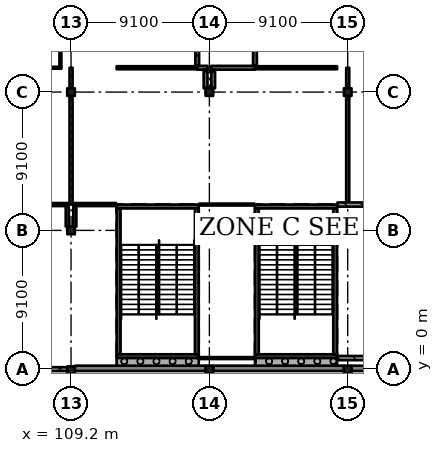
"""IFC4 building model, lengths in metres.
Left out: names, types, materials, properties, quantities, classifications, styles, units other than length and angle.
Written with IfcOpenShell. Run it as: python <this file> out.ifc"""

import sys

from ifc_helpers import new_model, si_unit, direction, frame, frame_2d, origin, origin_2d, place, context, subcontext, project, spatial, rectangle, extrude, element, fill, save


model = new_model("IFC4")
c1 = context("Model", 3, precision=1e-05, world=origin(), true_north=direction((0.0, 1.0)))
c2 = subcontext(c1, "Body", "Model", "MODEL_VIEW")
j1 = project(units=[si_unit("LENGTHUNIT", "METRE"), si_unit("PLANEANGLEUNIT", "RADIAN")], contexts=[c1])
p1 = place(None, origin())
s1 = spatial("IfcSite", under=j1, at=p1, CompositionType="ELEMENT")
p2 = place(p1, origin())
s2 = spatial("IfcBuilding", under=s1, at=p2, CompositionType="ELEMENT")
p3 = place(p2, frame((0.0, 0.0, 24.57)))
s3 = spatial("IfcBuildingStorey", under=s2, at=p3, CompositionType="ELEMENT", Elevation=24.57)
for number, where, z_axis, x_axis in (
    (1, (109.2, -0.1, 0.0), (0.0, 0.0, 1.0), (1.0, 0.0, 0.0)),
    (2, (109.2, 9.1, 0.0), (0.0, 0.0, 1.0), (1.0, 0.0, 0.0)),
    (3, (109.2, 18.2, 0.0), (0.0, 0.0, 1.0), (1.0, 0.0, 0.0)),
    (4, (118.3, -0.05, 0.0), (0.0, 0.0, 1.0), (1.0, 0.0, 0.0)),
    (5, (118.3, 9.1, 0.0), (0.0, 0.0, 1.0), (1.0, 0.0, 0.0)),
    (6, (118.3, 18.2, 0.0), (0.0, 0.0, 1.0), (1.0, 0.0, 0.0)),
    (7, (127.4, -0.05, 0.0), (0.0, 0.0, 1.0), (1.0, 0.0, 0.0)),
    (8, (127.4, 9.1, 0.0), (0.0, 0.0, 1.0), (1.0, 0.0, 0.0)),
    (9, (127.4, 18.2, 0.0), (0.0, 0.0, 1.0), (1.0, 0.0, 0.0)),
):
    element("IfcColumn", number, at=place(p3, frame(where, z_axis=z_axis, x_axis=x_axis)), inside=s3, PredefinedType="COLUMN", context=c2, shape_type="SweptSolid", body=[
        extrude(rectangle(XDim=0.5, YDim=0.5, at=origin_2d()), origin(), (0.0, 0.0, 1.0), 4.55),
    ])
p4 = place(p3, frame((126.7, 0.825, 0.0), z_axis=(0.0, 0.0, 1.0), x_axis=(-1.0, 0.0, 0.0)))
e10 = element("IfcWall", 10, at=p4, inside=s3, PredefinedType="SHEAR", context=c2, shape_type="SweptSolid", body=[
    extrude(rectangle(XDim=5.4, YDim=0.25, at=frame_2d((2.7, 0.0))), origin(), (0.0, 0.0, 1.0), 4.55),
])
p5 = place(p3, frame((126.7, 10.675, 0.0), z_axis=(0.0, 0.0, 1.0), x_axis=(-1.0, 0.0, 0.0)))
e11 = element("IfcWall", 11, at=p5, inside=s3, PredefinedType="SHEAR", context=c2, shape_type="SweptSolid", body=[
    extrude(rectangle(XDim=5.4, YDim=0.25, at=frame_2d((2.7, 0.0))), origin(), (0.0, 0.0, 1.0), 4.55),
])
p6 = place(p5, frame((1.5, 0.0, 0.0)))
e12 = element("IfcOpeningElement", 12, at=p6, cuts=e11, PredefinedType="OPENING", context=c2, shape_type="SweptSolid", body=[
    extrude(rectangle(XDim=2.4, YDim=2.1, at=frame_2d((1.2, 1.05))), frame((0.0, 0.135, 0.0), z_axis=(0.0, -1.0, 0.0), x_axis=(1.0, 0.0, 0.0)), (0.0, 0.0, 1.0), 0.27),
])
for number, where, z_axis, x_axis in (
    (13, (121.425, 10.55, 0.0), (0.0, 0.0, 1.0), (0.0, -1.0, 0.0)),
    (14, (126.575, 10.55, 0.0), (0.0, 0.0, 1.0), (0.0, -1.0, 0.0)),
):
    element("IfcWall", number, at=place(p3, frame(where, z_axis=z_axis, x_axis=x_axis)), inside=s3, PredefinedType="SHEAR", context=c2, shape_type="SweptSolid", body=[
        extrude(rectangle(XDim=9.6, YDim=0.25, at=frame_2d((4.8, 0.0))), origin(), (0.0, 0.0, 1.0), 4.55),
    ])
p7 = place(p3, frame((117.6, 0.825, 0.0), z_axis=(0.0, 0.0, 1.0), x_axis=(-1.0, 0.0, 0.0)))
e15 = element("IfcWall", 15, at=p7, inside=s3, PredefinedType="SHEAR", context=c2, shape_type="SweptSolid", body=[
    extrude(rectangle(XDim=5.4, YDim=0.25, at=frame_2d((2.7, 0.0))), origin(), (0.0, 0.0, 1.0), 4.55),
])
p8 = place(p3, frame((117.6, 10.675, 0.0), z_axis=(0.0, 0.0, 1.0), x_axis=(-1.0, 0.0, 0.0)))
e16 = element("IfcWall", 16, at=p8, inside=s3, PredefinedType="SHEAR", context=c2, shape_type="SweptSolid", body=[
    extrude(rectangle(XDim=5.4, YDim=0.25, at=frame_2d((2.7, 0.0))), origin(), (0.0, 0.0, 1.0), 4.55),
])
p9 = place(p8, frame((1.5, 0.0, 0.0)))
e17 = element("IfcOpeningElement", 17, at=p9, cuts=e16, PredefinedType="OPENING", context=c2, shape_type="SweptSolid", body=[
    extrude(rectangle(XDim=2.4, YDim=2.1, at=frame_2d((1.2, 1.05))), frame((0.0, 0.135, 0.0), z_axis=(0.0, -1.0, 0.0), x_axis=(1.0, 0.0, 0.0)), (0.0, 0.0, 1.0), 0.27),
])
for number, where, z_axis, x_axis in (
    (18, (112.325, 10.55, 0.0), (0.0, 0.0, 1.0), (0.0, -1.0, 0.0)),
    (19, (117.475, 10.55, 0.0), (0.0, 0.0, 1.0), (0.0, -1.0, 0.0)),
):
    element("IfcWall", number, at=place(p3, frame(where, z_axis=z_axis, x_axis=x_axis)), inside=s3, PredefinedType="SHEAR", context=c2, shape_type="SweptSolid", body=[
        extrude(rectangle(XDim=9.6, YDim=0.25, at=frame_2d((4.8, 0.0))), origin(), (0.0, 0.0, 1.0), 4.55),
    ])
p10 = place(p3, frame((104.65, -0.025, 0.0), z_axis=(0.0, 0.0, 1.0), x_axis=(1.0, 0.0, 0.0)))
e20 = element("IfcWall", 20, at=p10, inside=s3, PredefinedType="SOLIDWALL", context=c2, shape_type="SweptSolid", body=[
    extrude(rectangle(XDim=4.3, YDim=0.25, at=frame_2d((2.15, 0.0))), origin(), (0.0, 0.0, 1.0), 3.6),
])
p11 = place(p3, frame((109.45, 0.025, 0.0), z_axis=(0.0, 0.0, 1.0), x_axis=(1.0, 0.0, 0.0)))
e21 = element("IfcWall", 21, at=p11, inside=s3, PredefinedType="SOLIDWALL", context=c2, shape_type="SweptSolid", body=[
    extrude(rectangle(XDim=8.6, YDim=0.35, at=frame_2d((4.3, 0.0))), origin(), (0.0, 0.0, 1.0), 3.6),
])
p12 = place(p3, frame((118.55, 0.025, 0.0), z_axis=(0.0, 0.0, 1.0), x_axis=(1.0, 0.0, 0.0)))
e22 = element("IfcWall", 22, at=p12, inside=s3, PredefinedType="SOLIDWALL", context=c2, shape_type="SweptSolid", body=[
    extrude(rectangle(XDim=8.6, YDim=0.35, at=frame_2d((4.3, 0.0))), origin(), (0.0, 0.0, 1.0), 3.6),
])
p13 = place(p3, frame((127.65, 0.025, 0.0), z_axis=(0.0, 0.0, 1.0), x_axis=(1.0, 0.0, 0.0)))
e23 = element("IfcWall", 23, at=p13, inside=s3, PredefinedType="SOLIDWALL", context=c2, shape_type="SweptSolid", body=[
    extrude(rectangle(XDim=8.6, YDim=0.35, at=frame_2d((4.3, 0.0))), origin(), (0.0, 0.0, 1.0), 3.6),
])
p14 = place(p3, frame((121.3, 0.45, 0.0), z_axis=(0.0, 0.0, 1.0), x_axis=(1.0, 0.0, 0.0)))
e24 = element("IfcWall", 24, at=p14, inside=s3, PredefinedType="SOLIDWALL", context=c2, shape_type="SweptSolid", body=[
    extrude(rectangle(XDim=5.4, YDim=0.5, at=frame_2d((2.7, 0.0))), origin(), (0.0, 0.0, 1.0), 4.35),
])
p15 = place(p3, frame((112.2, 0.45, 0.0), z_axis=(0.0, 0.0, 1.0), x_axis=(1.0, 0.0, 0.0)))
e25 = element("IfcWall", 25, at=p15, inside=s3, PredefinedType="SOLIDWALL", context=c2, shape_type="SweptSolid", body=[
    extrude(rectangle(XDim=5.4, YDim=0.5, at=frame_2d((2.7, 0.0))), origin(), (0.0, 0.0, 1.0), 4.35),
])
p16 = place(p3, frame((104.9, 19.8, 0.0), z_axis=(0.0, 0.0, 1.0), x_axis=(1.0, 0.0, 0.0)))
e26 = element("IfcWall", 26, at=p16, inside=s3, PredefinedType="PARTITIONING", context=c2, shape_type="SweptSolid", body=[
    extrude(rectangle(XDim=3.663, YDim=0.125, at=frame_2d((1.831, 0.0))), origin(), (0.0, 0.0, 1.0), 4.35),
])
p17 = place(p16, frame((1.35, 0.0, 0.0)))
e27 = element("IfcOpeningElement", 27, at=p17, cuts=e26, PredefinedType="OPENING", context=c2, shape_type="SweptSolid", body=[
    extrude(rectangle(XDim=0.9, YDim=2.1, at=frame_2d((0.45, 1.05))), frame((0.0, 0.073, 0.0), z_axis=(0.0, -1.0, 0.0), x_axis=(1.0, 0.0, 0.0)), (0.0, 0.0, 1.0), 0.145),
])
p18 = place(p3, frame((108.5, 19.863, 0.0), z_axis=(0.0, 0.0, 1.0), x_axis=(0.0, 1.0, 0.0)))
e28 = element("IfcWall", 28, at=p18, inside=s3, PredefinedType="PARTITIONING", context=c2, shape_type="SweptSolid", body=[
    extrude(rectangle(XDim=7.125, YDim=0.125, at=frame_2d((3.562, 0.0))), origin(), (0.0, 0.0, 1.0), 4.35),
])
p19 = place(p3, frame((108.95, 9.35, 0.0), z_axis=(0.0, 0.0, 1.0), x_axis=(0.0, 1.0, 0.0)))
e29 = element("IfcWall", 29, at=p19, inside=s3, PredefinedType="PARTITIONING", context=c2, shape_type="SweptSolid", body=[
    extrude(rectangle(XDim=1.35, YDim=0.2, at=frame_2d((0.675, 0.0))), origin(), (0.0, 0.0, 1.0), 4.35),
])
p20 = place(p3, frame((109.05, 10.8, 0.0), z_axis=(0.0, 0.0, 1.0), x_axis=(-1.0, 0.0, 0.0)))
e30 = element("IfcWall", 30, at=p20, inside=s3, PredefinedType="PARTITIONING", context=c2, shape_type="SweptSolid", body=[
    extrude(rectangle(XDim=4.15, YDim=0.2, at=frame_2d((2.075, 0.0))), origin(), (0.0, 0.0, 1.0), 4.35),
])
p21 = place(p20, frame((1.15, 0.0, 0.0)))
e31 = element("IfcOpeningElement", 31, at=p21, cuts=e30, PredefinedType="OPENING", context=c2, shape_type="SweptSolid", body=[
    extrude(rectangle(XDim=1.8, YDim=2.4, at=frame_2d((0.9, 1.2))), frame((0.0, 0.11, 0.0), z_axis=(0.0, -1.0, 0.0), x_axis=(1.0, 0.0, 0.0)), (0.0, 0.0, 1.0), 0.22),
])
p22 = place(p3, frame((109.2, 10.8, 0.0), z_axis=(0.0, 0.0, 1.0), x_axis=(0.0, 1.0, 0.0)))
e32 = element("IfcWall", 32, at=p22, inside=s3, PredefinedType="PARTITIONING", context=c2, shape_type="SweptSolid", body=[
    extrude(rectangle(XDim=7.15, YDim=0.2, at=frame_2d((3.575, 0.0))), origin(), (0.0, 0.0, 1.0), 3.6),
])
p23 = place(p22, frame((0.85, 0.0, 0.0)))
e33 = element("IfcOpeningElement", 33, at=p23, cuts=e32, PredefinedType="OPENING", context=c2, shape_type="SweptSolid", body=[
    extrude(rectangle(XDim=1.8, YDim=2.4, at=frame_2d((0.9, 1.2))), frame((0.0, 0.11, 0.0), z_axis=(0.0, -1.0, 0.0), x_axis=(1.0, 0.0, 0.0)), (0.0, 0.0, 1.0), 0.22),
])
p24 = place(p22, frame((4.45, 0.0, 0.0)))
e34 = element("IfcOpeningElement", 34, at=p24, cuts=e32, PredefinedType="OPENING", context=c2, shape_type="SweptSolid", body=[
    extrude(rectangle(XDim=1.8, YDim=2.4, at=frame_2d((0.9, 1.2))), frame((0.0, 0.11, 0.0), z_axis=(0.0, -1.0, 0.0), x_axis=(1.0, 0.0, 0.0)), (0.0, 0.0, 1.0), 0.22),
])
p25 = place(p3, frame((109.2, 18.45, 0.0), z_axis=(0.0, 0.0, 1.0), x_axis=(0.0, 1.0, 0.0)))
e35 = element("IfcWall", 35, at=p25, inside=s3, PredefinedType="PARTITIONING", context=c2, shape_type="SweptSolid", body=[
    extrude(rectangle(XDim=1.35, YDim=0.2, at=frame_2d((0.675, 0.0))), origin(), (0.0, 0.0, 1.0), 3.6),
])
p26 = place(p3, frame((109.45, 10.7, 0.0), z_axis=(0.0, 0.0, 1.0), x_axis=(0.0, -1.0, 0.0)))
e36 = element("IfcWall", 36, at=p26, inside=s3, PredefinedType="PARTITIONING", context=c2, shape_type="SweptSolid", body=[
    extrude(rectangle(XDim=1.35, YDim=0.2, at=frame_2d((0.675, 0.0))), origin(), (0.0, 0.0, 1.0), 4.35),
])
p27 = place(p3, frame((112.17, 10.8, 0.0), z_axis=(0.0, 0.0, 1.0), x_axis=(-1.0, 0.0, 0.0)))
e37 = element("IfcWall", 37, at=p27, inside=s3, PredefinedType="PARTITIONING", context=c2, shape_type="SweptSolid", body=[
    extrude(rectangle(XDim=2.82, YDim=0.2, at=frame_2d((1.41, 0.0))), origin(), (0.0, 0.0, 1.0), 4.35),
])
p28 = place(p27, frame((0.55, 0.0, 0.0)))
e38 = element("IfcOpeningElement", 38, at=p28, cuts=e37, PredefinedType="OPENING", context=c2, shape_type="SweptSolid", body=[
    extrude(rectangle(XDim=1.8, YDim=2.4, at=frame_2d((0.9, 1.2))), frame((0.0, 0.11, 0.0), z_axis=(0.0, -1.0, 0.0), x_axis=(1.0, 0.0, 0.0)), (0.0, 0.0, 1.0), 0.22),
])
p29 = place(p3, frame((112.2, 19.8, 0.0), z_axis=(0.0, 0.0, 1.0), x_axis=(1.0, 0.0, 0.0)))
e39 = element("IfcWall", 39, at=p29, inside=s3, PredefinedType="PARTITIONING", context=c2, shape_type="SweptSolid", body=[
    extrude(rectangle(XDim=5.3, YDim=0.2, at=frame_2d((2.65, 0.0))), origin(), (0.0, 0.0, 1.0), 4.35),
])
p30 = place(p29, frame((1.75, 0.0, 0.0)))
e40 = element("IfcOpeningElement", 40, at=p30, cuts=e39, PredefinedType="OPENING", context=c2, shape_type="SweptSolid", body=[
    extrude(rectangle(XDim=1.8, YDim=2.4, at=frame_2d((0.9, 1.2))), frame((0.0, 0.11, 0.0), z_axis=(0.0, -1.0, 0.0), x_axis=(1.0, 0.0, 0.0)), (0.0, 0.0, 1.0), 0.22),
])
p31 = place(p3, frame((117.5, 19.8, 0.0), z_axis=(0.0, 0.0, 1.0), x_axis=(1.0, 0.0, 0.0)))
e41 = element("IfcWall", 41, at=p31, inside=s3, PredefinedType="SOLIDWALL", context=c2, shape_type="SweptSolid", body=[
    extrude(rectangle(XDim=0.675, YDim=0.25, at=frame_2d((0.337, 0.0))), origin(), (0.0, 0.0, 1.0), 4.35),
])
p32 = place(p3, frame((117.5, 19.925, 0.0), z_axis=(0.0, 0.0, 1.0), x_axis=(0.0, 1.0, 0.0)))
e42 = element("IfcWall", 42, at=p32, inside=s3, PredefinedType="SOLIDWALL", context=c2, shape_type="SweptSolid", body=[
    extrude(rectangle(XDim=2.845, YDim=0.25, at=frame_2d((1.422, 0.0))), origin(), (0.0, 0.0, 1.0), 4.35),
])
for number, where, z_axis, x_axis in (
    (43, (117.63, 8.85, 0.0), (0.0, 0.0, 1.0), (1.0, 0.0, 0.0)),
    (44, (118.05, 9.35, 0.0), (0.0, 0.0, 1.0), (-1.0, 0.0, 0.0)),
):
    element("IfcWall", number, at=place(p3, frame(where, z_axis=z_axis, x_axis=x_axis)), inside=s3, PredefinedType="PARTITIONING", context=c2, shape_type="SweptSolid", body=[
        extrude(rectangle(XDim=0.42, YDim=0.125, at=frame_2d((0.21, 0.0))), origin(), (0.0, 0.0, 1.0), 4.35),
    ])
p33 = place(p3, frame((118.05, 19.675, 0.0), z_axis=(0.0, 0.0, 1.0), x_axis=(0.0, -1.0, 0.0)))
e45 = element("IfcWall", 45, at=p33, inside=s3, PredefinedType="SOLIDWALL", context=c2, shape_type="SweptSolid", body=[
    extrude(rectangle(XDim=1.225, YDim=0.25, at=frame_2d((0.613, 0.0))), origin(), (0.0, 0.0, 1.0), 3.6),
])
p34 = place(p3, frame((118.425, 19.8, 0.0), z_axis=(0.0, 0.0, 1.0), x_axis=(1.0, 0.0, 0.0)))
e46 = element("IfcWall", 46, at=p34, inside=s3, PredefinedType="SOLIDWALL", context=c2, shape_type="SweptSolid", body=[
    extrude(rectangle(XDim=2.875, YDim=0.25, at=frame_2d((1.438, 0.0))), origin(), (0.0, 0.0, 1.0), 4.35),
])
p35 = place(p34, frame((0.95, 0.0, 0.0)))
e47 = element("IfcOpeningElement", 47, at=p35, cuts=e46, PredefinedType="OPENING", context=c2, shape_type="SweptSolid", body=[
    extrude(rectangle(XDim=1.0, YDim=2.1, at=frame_2d((0.5, 1.05))), frame((0.0, 0.135, 0.0), z_axis=(0.0, -1.0, 0.0), x_axis=(1.0, 0.0, 0.0)), (0.0, 0.0, 1.0), 0.27),
])
p36 = place(p3, frame((118.55, 18.45, 0.0), z_axis=(0.0, 0.0, 1.0), x_axis=(0.0, 1.0, 0.0)))
e48 = element("IfcWall", 48, at=p36, inside=s3, PredefinedType="SOLIDWALL", context=c2, shape_type="SweptSolid", body=[
    extrude(rectangle(XDim=1.225, YDim=0.25, at=frame_2d((0.613, 0.0))), origin(), (0.0, 0.0, 1.0), 3.6),
])
p37 = place(p3, frame((121.27, 0.7, 0.0), z_axis=(0.0, 0.0, 1.0), x_axis=(-1.0, 0.0, 0.0)))
e49 = element("IfcWall", 49, at=p37, inside=s3, PredefinedType="PARTITIONING", context=c2, shape_type="SweptSolid", body=[
    extrude(rectangle(XDim=3.64, YDim=0.125, at=frame_2d((1.82, 0.0))), origin(), (0.0, 0.0, 1.0), 4.35),
])
p38 = place(p3, frame((121.27, 10.8, 0.0), z_axis=(0.0, 0.0, 1.0), x_axis=(-1.0, 0.0, 0.0)))
e50 = element("IfcWall", 50, at=p38, inside=s3, PredefinedType="PARTITIONING", context=c2, shape_type="SweptSolid", body=[
    extrude(rectangle(XDim=3.64, YDim=0.125, at=frame_2d((1.82, 0.0))), origin(), (0.0, 0.0, 1.0), 4.35),
])
p39 = place(p38, frame((1.35, 0.0, 0.0)))
e51 = element("IfcOpeningElement", 51, at=p39, cuts=e50, PredefinedType="OPENING", context=c2, shape_type="SweptSolid", body=[
    extrude(rectangle(XDim=0.9, YDim=2.1, at=frame_2d((0.45, 1.05))), frame((0.0, 0.073, 0.0), z_axis=(0.0, -1.0, 0.0), x_axis=(1.0, 0.0, 0.0)), (0.0, 0.0, 1.0), 0.145),
])
p40 = place(p3, frame((121.3, 19.8, 0.0), z_axis=(0.0, 0.0, 1.0), x_axis=(1.0, 0.0, 0.0)))
e52 = element("IfcWall", 52, at=p40, inside=s3, PredefinedType="PARTITIONING", context=c2, shape_type="SweptSolid", body=[
    extrude(rectangle(XDim=5.4, YDim=0.2, at=frame_2d((2.7, 0.0))), origin(), (0.0, 0.0, 1.0), 4.35),
])
p41 = place(p40, frame((1.85, 0.0, 0.0)))
e53 = element("IfcOpeningElement", 53, at=p41, cuts=e52, PredefinedType="OPENING", context=c2, shape_type="SweptSolid", body=[
    extrude(rectangle(XDim=1.8, YDim=2.4, at=frame_2d((0.9, 1.2))), frame((0.0, 0.11, 0.0), z_axis=(0.0, -1.0, 0.0), x_axis=(1.0, 0.0, 0.0)), (0.0, 0.0, 1.0), 0.22),
])
p42 = place(p3, frame((121.3, 19.925, 0.0), z_axis=(0.0, 0.0, 1.0), x_axis=(0.0, 1.0, 0.0)))
e54 = element("IfcWall", 54, at=p42, inside=s3, PredefinedType="SOLIDWALL", context=c2, shape_type="SweptSolid", body=[
    extrude(rectangle(XDim=6.945, YDim=0.25, at=frame_2d((3.473, 0.0))), origin(), (0.0, 0.0, 1.0), 4.35),
])
for number, where, z_axis, x_axis in (
    (55, (126.73, 8.85, 0.0), (0.0, 0.0, 1.0), (1.0, 0.0, 0.0)),
    (56, (127.15, 9.35, 0.0), (0.0, 0.0, 1.0), (-1.0, 0.0, 0.0)),
):
    element("IfcWall", number, at=place(p3, frame(where, z_axis=z_axis, x_axis=x_axis)), inside=s3, PredefinedType="SOLIDWALL", context=c2, shape_type="SweptSolid", body=[
        extrude(rectangle(XDim=0.42, YDim=0.275, at=frame_2d((0.21, 0.0))), origin(), (0.0, 0.0, 1.0), 4.35),
    ])
p43 = place(p3, frame((126.73, 10.8, 0.0), z_axis=(0.0, 0.0, 1.0), x_axis=(1.0, 0.0, 0.0)))
e57 = element("IfcWall", 57, at=p43, inside=s3, PredefinedType="SOLIDWALL", context=c2, shape_type="SweptSolid", body=[
    extrude(rectangle(XDim=3.64, YDim=0.275, at=frame_2d((1.82, 0.0))), origin(), (0.0, 0.0, 1.0), 4.35),
])
p44 = place(p43, frame((1.59, 0.0, 0.0)))
e58 = element("IfcOpeningElement", 58, at=p44, cuts=e57, PredefinedType="OPENING", context=c2, shape_type="SweptSolid", body=[
    extrude(rectangle(XDim=1.2, YDim=2.4, at=frame_2d((0.6, 1.2))), frame((0.0, 0.147, 0.0), z_axis=(0.0, -1.0, 0.0), x_axis=(1.0, 0.0, 0.0)), (0.0, 0.0, 1.0), 0.295),
])
p45 = place(p3, frame((127.4, 10.938, 0.0), z_axis=(0.0, 0.0, 1.0), x_axis=(0.0, 1.0, 0.0)))
e59 = element("IfcWall", 59, at=p45, inside=s3, PredefinedType="PARTITIONING", context=c2, shape_type="SweptSolid", body=[
    extrude(rectangle(XDim=7.012, YDim=0.2, at=frame_2d((3.506, 0.0))), origin(), (0.0, 0.0, 1.0), 3.6),
])
p46 = place(p45, frame((0.85, 0.0, 0.0)))
e60 = element("IfcOpeningElement", 60, at=p46, cuts=e59, PredefinedType="OPENING", context=c2, shape_type="SweptSolid", body=[
    extrude(rectangle(XDim=1.8, YDim=2.4, at=frame_2d((0.9, 1.2))), frame((0.0, 0.11, 0.0), z_axis=(0.0, -1.0, 0.0), x_axis=(1.0, 0.0, 0.0)), (0.0, 0.0, 1.0), 0.22),
])
p47 = place(p45, frame((4.35, 0.0, 0.0)))
e61 = element("IfcOpeningElement", 61, at=p47, cuts=e59, PredefinedType="OPENING", context=c2, shape_type="SweptSolid", body=[
    extrude(rectangle(XDim=1.8, YDim=2.4, at=frame_2d((0.9, 1.2))), frame((0.0, 0.11, 0.0), z_axis=(0.0, -1.0, 0.0), x_axis=(1.0, 0.0, 0.0)), (0.0, 0.0, 1.0), 0.22),
])
p48 = place(p3, frame((127.4, 18.45, 0.0), z_axis=(0.0, 0.0, 1.0), x_axis=(0.0, 1.0, 0.0)))
e62 = element("IfcWall", 62, at=p48, inside=s3, PredefinedType="PARTITIONING", context=c2, shape_type="SweptSolid", body=[
    extrude(rectangle(XDim=1.35, YDim=0.2, at=frame_2d((0.675, 0.0))), origin(), (0.0, 0.0, 1.0), 3.6),
])
p49 = place(p3, frame((130.37, 0.7, 0.0), z_axis=(0.0, 0.0, 1.0), x_axis=(-1.0, 0.0, 0.0)))
e63 = element("IfcWall", 63, at=p49, inside=s3, PredefinedType="SOLIDWALL", context=c2, shape_type="SweptSolid", body=[
    extrude(rectangle(XDim=3.64, YDim=0.275, at=frame_2d((1.82, 0.0))), origin(), (0.0, 0.0, 1.0), 4.35),
])
p50 = place(p35, origin())
e64 = element("IfcDoor", 64, at=p50, inside=s3, OperationType="SINGLE_SWING_LEFT", PredefinedType="DOOR", context=c2, shape_type="SweptSolid", body=[
    extrude(rectangle(XDim=1.0, YDim=2.1, at=frame_2d((0.5, 1.05))), frame((0.0, 0.025, 0.0), z_axis=(0.0, -1.0, 0.0), x_axis=(1.0, 0.0, 0.0)), (0.0, 0.0, 1.0), 0.05),
])
fill(e47, e64)
p51 = place(p44, origin())
e65 = element("IfcDoor", 65, at=p51, inside=s3, OperationType="SINGLE_SWING_RIGHT", PredefinedType="DOOR", context=c2, shape_type="SweptSolid", body=[
    extrude(rectangle(XDim=1.2, YDim=2.4, at=frame_2d((0.6, 1.2))), frame((0.0, 0.025, 0.0), z_axis=(0.0, -1.0, 0.0), x_axis=(1.0, 0.0, 0.0)), (0.0, 0.0, 1.0), 0.05),
])
fill(e58, e65)
p52 = place(p39, origin())
e66 = element("IfcDoor", 66, at=p52, inside=s3, OperationType="SINGLE_SWING_RIGHT", PredefinedType="DOOR", context=c2, shape_type="SweptSolid", body=[
    extrude(rectangle(XDim=0.9, YDim=2.1, at=frame_2d((0.45, 1.05))), frame((0.0, 0.025, 0.0), z_axis=(0.0, -1.0, 0.0), x_axis=(1.0, 0.0, 0.0)), (0.0, 0.0, 1.0), 0.05),
])
fill(e51, e66)
p53 = place(p46, origin())
e67 = element("IfcDoor", 67, at=p53, inside=s3, OperationType="DOUBLE_DOOR_SINGLE_SWING", PredefinedType="DOOR", context=c2, shape_type="SweptSolid", body=[
    extrude(rectangle(XDim=1.8, YDim=2.4, at=frame_2d((0.9, 1.2))), frame((0.0, 0.025, 0.0), z_axis=(0.0, -1.0, 0.0), x_axis=(1.0, 0.0, 0.0)), (0.0, 0.0, 1.0), 0.05),
])
fill(e60, e67)
p54 = place(p47, origin())
e68 = element("IfcDoor", 68, at=p54, inside=s3, OperationType="DOUBLE_DOOR_SINGLE_SWING", PredefinedType="DOOR", context=c2, shape_type="SweptSolid", body=[
    extrude(rectangle(XDim=1.8, YDim=2.4, at=frame_2d((0.9, 1.2))), frame((0.0, 0.025, 0.0), z_axis=(0.0, -1.0, 0.0), x_axis=(1.0, 0.0, 0.0)), (0.0, 0.0, 1.0), 0.05),
])
fill(e61, e68)
p55 = place(p23, origin())
e69 = element("IfcDoor", 69, at=p55, inside=s3, OperationType="DOUBLE_DOOR_SINGLE_SWING", PredefinedType="DOOR", context=c2, shape_type="SweptSolid", body=[
    extrude(rectangle(XDim=1.8, YDim=2.4, at=frame_2d((0.9, 1.2))), frame((0.0, 0.025, 0.0), z_axis=(0.0, -1.0, 0.0), x_axis=(1.0, 0.0, 0.0)), (0.0, 0.0, 1.0), 0.05),
])
fill(e33, e69)
p56 = place(p24, origin())
e70 = element("IfcDoor", 70, at=p56, inside=s3, OperationType="DOUBLE_DOOR_SINGLE_SWING", PredefinedType="DOOR", context=c2, shape_type="SweptSolid", body=[
    extrude(rectangle(XDim=1.8, YDim=2.4, at=frame_2d((0.9, 1.2))), frame((0.0, 0.025, 0.0), z_axis=(0.0, -1.0, 0.0), x_axis=(1.0, 0.0, 0.0)), (0.0, 0.0, 1.0), 0.05),
])
fill(e34, e70)
p57 = place(p30, origin())
e71 = element("IfcDoor", 71, at=p57, inside=s3, OperationType="DOUBLE_DOOR_SINGLE_SWING", PredefinedType="DOOR", context=c2, shape_type="SweptSolid", body=[
    extrude(rectangle(XDim=1.8, YDim=2.4, at=frame_2d((0.9, 1.2))), frame((0.0, 0.025, 0.0), z_axis=(0.0, -1.0, 0.0), x_axis=(1.0, 0.0, 0.0)), (0.0, 0.0, 1.0), 0.05),
])
fill(e40, e71)
p58 = place(p41, origin())
e72 = element("IfcDoor", 72, at=p58, inside=s3, OperationType="DOUBLE_DOOR_SINGLE_SWING", PredefinedType="DOOR", context=c2, shape_type="SweptSolid", body=[
    extrude(rectangle(XDim=1.8, YDim=2.4, at=frame_2d((0.9, 1.2))), frame((0.0, 0.025, 0.0), z_axis=(0.0, -1.0, 0.0), x_axis=(1.0, 0.0, 0.0)), (0.0, 0.0, 1.0), 0.05),
])
fill(e53, e72)
p59 = place(p28, origin())
e73 = element("IfcDoor", 73, at=p59, inside=s3, OperationType="DOUBLE_DOOR_SINGLE_SWING", PredefinedType="DOOR", context=c2, shape_type="SweptSolid", body=[
    extrude(rectangle(XDim=1.8, YDim=2.4, at=frame_2d((0.9, 1.2))), frame((0.0, 0.025, 0.0), z_axis=(0.0, -1.0, 0.0), x_axis=(1.0, 0.0, 0.0)), (0.0, 0.0, 1.0), 0.05),
])
fill(e38, e73)
p60 = place(p6, origin())
e74 = element("IfcDoor", 74, at=p60, inside=s3, OperationType="DOUBLE_DOOR_SINGLE_SWING", PredefinedType="DOOR", context=c2, shape_type="SweptSolid", body=[
    extrude(rectangle(XDim=2.4, YDim=2.1, at=frame_2d((1.2, 1.05))), frame((0.0, 0.025, 0.0), z_axis=(0.0, -1.0, 0.0), x_axis=(1.0, 0.0, 0.0)), (0.0, 0.0, 1.0), 0.05),
])
fill(e12, e74)
p61 = place(p9, origin())
e75 = element("IfcDoor", 75, at=p61, inside=s3, OperationType="DOUBLE_DOOR_SINGLE_SWING", PredefinedType="DOOR", context=c2, shape_type="SweptSolid", body=[
    extrude(rectangle(XDim=2.4, YDim=2.1, at=frame_2d((1.2, 1.05))), frame((0.0, 0.025, 0.0), z_axis=(0.0, -1.0, 0.0), x_axis=(1.0, 0.0, 0.0)), (0.0, 0.0, 1.0), 0.05),
])
fill(e17, e75)
save(model, sys.argv[1])
